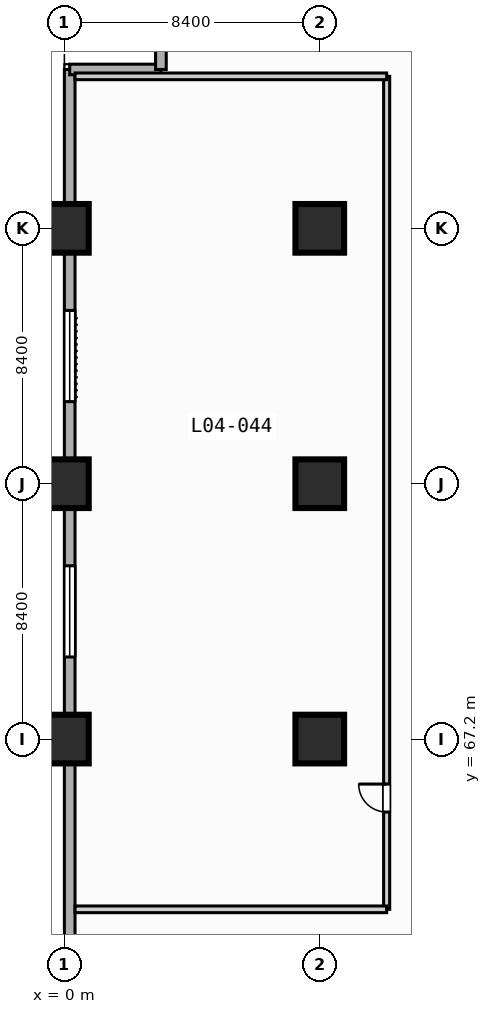
"""IFC4 building model, lengths in metres.
Left out: names, types, materials, properties, quantities, classifications, styles, units other than length and angle.
Written with IfcOpenShell. Run it as: python <this file> out.ifc"""

import sys

from ifc_helpers import new_model, si_unit, direction, frame, frame_2d, origin, origin_2d, place, context, subcontext, project, spatial, rectangle, extrude, element, fill, save


model = new_model("IFC4")
c1 = context("Model", 3, precision=1e-05, world=origin(), true_north=direction((0.0, 1.0)))
c2 = subcontext(c1, "Body", "Model", "MODEL_VIEW")
j1 = project(units=[si_unit("LENGTHUNIT", "METRE"), si_unit("PLANEANGLEUNIT", "RADIAN")], contexts=[c1])
p1 = place(None, origin())
s1 = spatial("IfcSite", under=j1, at=p1, CompositionType="ELEMENT")
p2 = place(p1, origin())
s2 = spatial("IfcBuilding", under=s1, at=p2, CompositionType="ELEMENT")
p3 = place(p2, frame((0.0, 0.0, 20.8)))
s3 = spatial("IfcBuildingStorey", under=s2, at=p3, CompositionType="ELEMENT", Elevation=20.8)
for number, where, z_axis, x_axis in (
    (1, (0.0, 67.2, 0.0), (0.0, 0.0, 1.0), (1.0, 0.0, 0.0)),
    (2, (0.0, 75.6, 0.0), (0.0, 0.0, 1.0), (1.0, 0.0, 0.0)),
    (3, (0.0, 84.0, 0.0), (0.0, 0.0, 1.0), (1.0, 0.0, 0.0)),
    (4, (8.4, 67.2, 0.0), (0.0, 0.0, 1.0), (1.0, 0.0, 0.0)),
    (5, (8.4, 75.6, 0.0), (0.0, 0.0, 1.0), (1.0, 0.0, 0.0)),
    (6, (8.4, 84.0, 0.0), (0.0, 0.0, 1.0), (1.0, 0.0, 0.0)),
):
    element("IfcColumn", number, at=place(p3, frame(where, z_axis=z_axis, x_axis=x_axis)), inside=s3, PredefinedType="COLUMN", context=c2, shape_type="SweptSolid", body=[
        extrude(rectangle(XDim=1.6, YDim=1.6, at=origin_2d()), origin(), (0.0, 0.0, 1.0), 5.2),
    ])
p4 = place(p3, frame((0.175, 3.175, 0.0), z_axis=(0.0, 0.0, 1.0), x_axis=(0.0, 1.0, 0.0)))
e7 = element("IfcWall", 7, at=p4, inside=s3, PredefinedType="STANDARD", context=c2, shape_type="SweptSolid", body=[
    extrude(rectangle(XDim=86.05, YDim=0.35, at=frame_2d((43.025, 0.0))), origin(), (0.0, 0.0, 1.0), 4.75),
])
p5 = place(p4, frame((33.125, 0.0, 0.85)))
e8 = element("IfcOpeningElement", 8, at=p5, cuts=e7, PredefinedType="OPENING", context=c2, shape_type="SweptSolid", body=[
    extrude(rectangle(XDim=3.0, YDim=2.4, at=frame_2d((1.5, 1.2))), frame((0.0, 0.185, 0.0), z_axis=(0.0, -1.0, 0.0), x_axis=(1.0, 0.0, 0.0)), (0.0, 0.0, 1.0), 0.37),
])
p6 = place(p4, frame((41.525, 0.0, 0.85)))
e9 = element("IfcOpeningElement", 9, at=p6, cuts=e7, PredefinedType="OPENING", context=c2, shape_type="SweptSolid", body=[
    extrude(rectangle(XDim=3.0, YDim=2.4, at=frame_2d((1.5, 1.2))), frame((0.0, 0.185, 0.0), z_axis=(0.0, -1.0, 0.0), x_axis=(1.0, 0.0, 0.0)), (0.0, 0.0, 1.0), 0.37),
])
p7 = place(p4, frame((49.925, 0.0, 0.85)))
e10 = element("IfcOpeningElement", 10, at=p7, cuts=e7, PredefinedType="OPENING", context=c2, shape_type="SweptSolid", body=[
    extrude(rectangle(XDim=3.0, YDim=2.4, at=frame_2d((1.5, 1.2))), frame((0.0, 0.185, 0.0), z_axis=(0.0, -1.0, 0.0), x_axis=(1.0, 0.0, 0.0)), (0.0, 0.0, 1.0), 0.37),
])
p8 = place(p4, frame((66.725, 0.0, 0.85)))
e11 = element("IfcOpeningElement", 11, at=p8, cuts=e7, PredefinedType="OPENING", context=c2, shape_type="SweptSolid", body=[
    extrude(rectangle(XDim=3.0, YDim=2.4, at=frame_2d((1.5, 1.2))), frame((0.0, 0.185, 0.0), z_axis=(0.0, -1.0, 0.0), x_axis=(1.0, 0.0, 0.0)), (0.0, 0.0, 1.0), 0.37),
])
p9 = place(p4, frame((75.125, 0.0, 0.85)))
e12 = element("IfcOpeningElement", 12, at=p9, cuts=e7, PredefinedType="OPENING", context=c2, shape_type="SweptSolid", body=[
    extrude(rectangle(XDim=3.0, YDim=2.4, at=frame_2d((1.5, 1.2))), frame((0.0, 0.185, 0.0), z_axis=(0.0, -1.0, 0.0), x_axis=(1.0, 0.0, 0.0)), (0.0, 0.0, 1.0), 0.37),
])
for number, where, z_axis, x_axis in (
    (13, (0.175, 89.225, 0.0), (0.0, 0.0, 1.0), (1.0, 0.0, 0.0)),
    (14, (3.175, 89.225, 0.0), (0.0, 0.0, 1.0), (0.0, 1.0, 0.0)),
):
    element("IfcWall", number, at=place(p3, frame(where, z_axis=z_axis, x_axis=x_axis)), inside=s3, PredefinedType="STANDARD", context=c2, shape_type="SweptSolid", body=[
        extrude(rectangle(XDim=3.0, YDim=0.35, at=frame_2d((1.5, 0.0))), origin(), (0.0, 0.0, 1.0), 4.75),
    ])
p10 = place(p3, frame((10.6, 61.6, 0.0), z_axis=(0.0, 0.0, 1.0), x_axis=(0.0, 1.0, 0.0)))
e15 = element("IfcWall", 15, at=p10, inside=s3, PredefinedType="PARTITIONING", context=c2, shape_type="SweptSolid", body=[
    extrude(rectangle(XDim=27.4, YDim=0.2, at=frame_2d((13.7, 0.0))), origin(), (0.0, 0.0, 1.0), 4.75),
])
p11 = place(p10, frame((3.2, 0.0, 0.0)))
e16 = element("IfcOpeningElement", 16, at=p11, cuts=e15, PredefinedType="OPENING", context=c2, shape_type="SweptSolid", body=[
    extrude(rectangle(XDim=0.92, YDim=2.1, at=frame_2d((0.46, 1.05))), frame((0.0, 0.11, 0.0), z_axis=(0.0, -1.0, 0.0), x_axis=(1.0, 0.0, 0.0)), (0.0, 0.0, 1.0), 0.22),
])
for number, where, z_axis, x_axis in (
    (17, (0.35, 61.6, 0.0), (0.0, 0.0, 1.0), (1.0, 0.0, 0.0)),
    (18, (0.35, 89.0, 0.0), (0.0, 0.0, 1.0), (1.0, 0.0, 0.0)),
):
    element("IfcWall", number, at=place(p3, frame(where, z_axis=z_axis, x_axis=x_axis)), inside=s3, PredefinedType="PARTITIONING", context=c2, shape_type="SweptSolid", body=[
        extrude(rectangle(XDim=10.25, YDim=0.22, at=frame_2d((5.125, 0.0))), origin(), (0.0, 0.0, 1.0), 4.75),
    ])
p12 = place(p8, origin())
e19 = element("IfcWindow", 19, at=p12, inside=s3, PartitioningType="SINGLE_PANEL", PredefinedType="WINDOW", context=c2, shape_type="SweptSolid", body=[
    extrude(rectangle(XDim=3.0, YDim=2.4, at=frame_2d((1.5, 1.2))), frame((0.0, 0.03, 0.0), z_axis=(0.0, -1.0, 0.0), x_axis=(1.0, 0.0, 0.0)), (0.0, 0.0, 1.0), 0.06),
])
fill(e11, e19)
p13 = place(p9, origin())
e20 = element("IfcWindow", 20, at=p13, inside=s3, PartitioningType="SINGLE_PANEL", PredefinedType="WINDOW", context=c2, shape_type="SweptSolid", body=[
    extrude(rectangle(XDim=3.0, YDim=2.4, at=frame_2d((1.5, 1.2))), frame((0.0, 0.03, 0.0), z_axis=(0.0, -1.0, 0.0), x_axis=(1.0, 0.0, 0.0)), (0.0, 0.0, 1.0), 0.06),
])
fill(e12, e20)
p14 = place(p11, origin())
e21 = element("IfcDoor", 21, at=p14, inside=s3, OperationType="SINGLE_SWING_RIGHT", PredefinedType="DOOR", context=c2, shape_type="SweptSolid", body=[
    extrude(rectangle(XDim=0.92, YDim=2.1, at=frame_2d((0.46, 1.05))), frame((0.0, 0.025, 0.0), z_axis=(0.0, -1.0, 0.0), x_axis=(1.0, 0.0, 0.0)), (0.0, 0.0, 1.0), 0.05),
])
fill(e16, e21)
save(model, sys.argv[1])
